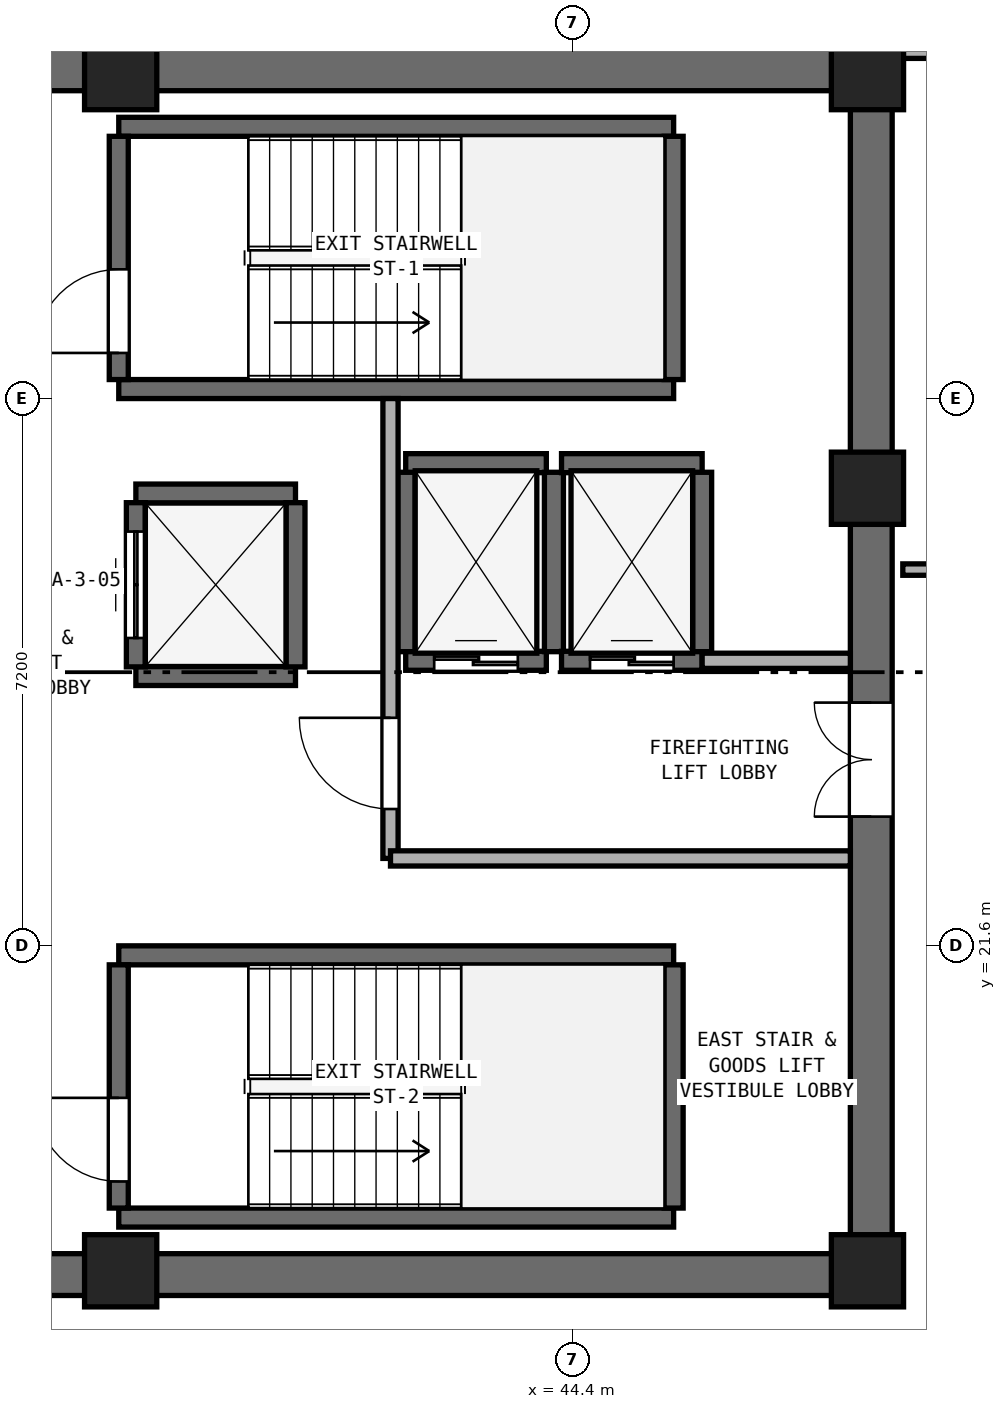
"""IFC4 building model, lengths in metres.
Left out: names, types, materials, properties, quantities, classifications, styles, units other than length and angle.
Written with IfcOpenShell. Run it as: python <this file> out.ifc"""

import sys

from ifc_helpers import new_model, si_unit, direction, frame, frame_2d, origin, origin_2d, place, context, subcontext, project, spatial, rectangle, extrude, element, fill, save


model = new_model("IFC4")
c1 = context("Model", 3, precision=1e-05, world=origin(), true_north=direction((0.0, 1.0)))
c2 = subcontext(c1, "Body", "Model", "MODEL_VIEW")
j1 = project(units=[si_unit("LENGTHUNIT", "METRE"), si_unit("PLANEANGLEUNIT", "RADIAN")], contexts=[c1])
p1 = place(None, origin())
s1 = spatial("IfcSite", under=j1, at=p1, CompositionType="ELEMENT")
p2 = place(p1, origin())
s2 = spatial("IfcBuilding", under=s1, at=p2, CompositionType="ELEMENT")
p3 = place(p2, frame((0.0, 0.0, 189.6)))
s3 = spatial("IfcBuildingStorey", under=s2, at=p3, CompositionType="ELEMENT", Elevation=189.6)
for number, where, z_axis, x_axis in (
    (1, (25.4, 17.275, 0.0), (0.0, 0.0, 1.0), (1.0, 0.0, 0.0)),
    (2, (25.4, 33.125, 0.0), (0.0, 0.0, 1.0), (1.0, 0.0, 0.0)),
):
    element("IfcWall", number, at=place(p3, frame(where, z_axis=z_axis, x_axis=x_axis)), inside=s3, PredefinedType="SHEAR", context=c2, shape_type="SweptSolid", body=[
        extrude(rectangle(XDim=23.2, YDim=0.55, at=frame_2d((11.6, 0.0))), origin(), (0.0, 0.0, 1.0), 3.54),
    ])
p4 = place(p3, frame((48.325, 17.55, 0.0), z_axis=(0.0, 0.0, 1.0), x_axis=(0.0, 1.0, 0.0)))
e3 = element("IfcWall", 3, at=p4, inside=s3, PredefinedType="SHEAR", context=c2, shape_type="SweptSolid", body=[
    extrude(rectangle(XDim=15.3, YDim=0.55, at=frame_2d((7.65, 0.0))), origin(), (0.0, 0.0, 1.0), 3.54),
])
p5 = place(p4, frame((5.75, 0.0, 0.0)))
e4 = element("IfcOpeningElement", 4, at=p5, cuts=e3, PredefinedType="OPENING", context=c2, shape_type="SweptSolid", body=[
    extrude(rectangle(XDim=1.5, YDim=2.15, at=frame_2d((0.75, 1.075))), frame((0.0, 0.285, 0.0), z_axis=(0.0, -1.0, 0.0), x_axis=(1.0, 0.0, 0.0)), (0.0, 0.0, 1.0), 0.57),
])
for number, where, z_axis, x_axis in (
    (5, (38.45, 17.325, 0.0), (0.0, 0.0, 1.0), (1.0, 0.0, 0.0)),
    (6, (48.275, 17.325, 0.0), (0.0, 0.0, 1.0), (1.0, 0.0, 0.0)),
    (7, (48.275, 27.62, 0.0), (0.0, 0.0, 1.0), (1.0, 0.0, 0.0)),
    (8, (48.275, 33.075, 0.0), (0.0, 0.0, 1.0), (1.0, 0.0, 0.0)),
    (9, (38.45, 33.075, 0.0), (0.0, 0.0, 1.0), (1.0, 0.0, 0.0)),
):
    element("IfcColumn", number, at=place(p3, frame(where, z_axis=z_axis, x_axis=x_axis)), inside=s3, PredefinedType="PILASTER", context=c2, shape_type="SweptSolid", body=[
        extrude(rectangle(XDim=0.95, YDim=0.95, at=origin_2d()), origin(), (0.0, 0.0, 1.0), 3.8),
    ])
for number, where, z_axis, x_axis in (
    (10, (38.425, 28.925, 0.0), (0.0, 0.0, 1.0), (1.0, 0.0, 0.0)),
    (11, (38.425, 32.375, 0.0), (0.0, 0.0, 1.0), (1.0, 0.0, 0.0)),
):
    element("IfcWall", number, at=place(p3, frame(where, z_axis=z_axis, x_axis=x_axis)), inside=s3, PredefinedType="SHEAR", context=c2, shape_type="SweptSolid", body=[
        extrude(rectangle(XDim=7.3, YDim=0.25, at=frame_2d((3.65, 0.0))), origin(), (0.0, 0.0, 1.0), 3.54),
    ])
p6 = place(p3, frame((38.425, 29.05, 0.0), z_axis=(0.0, 0.0, 1.0), x_axis=(0.0, 1.0, 0.0)))
e12 = element("IfcWall", 12, at=p6, inside=s3, PredefinedType="SHEAR", context=c2, shape_type="SweptSolid", body=[
    extrude(rectangle(XDim=3.2, YDim=0.25, at=frame_2d((1.6, 0.0))), origin(), (0.0, 0.0, 1.0), 3.54),
])
p7 = place(p6, frame((0.35, 0.0, 0.0)))
e13 = element("IfcOpeningElement", 13, at=p7, cuts=e12, PredefinedType="OPENING", context=c2, shape_type="SweptSolid", body=[
    extrude(rectangle(XDim=1.1, YDim=2.15, at=frame_2d((0.55, 1.075))), frame((0.0, 0.135, 0.0), z_axis=(0.0, -1.0, 0.0), x_axis=(1.0, 0.0, 0.0)), (0.0, 0.0, 1.0), 0.27),
])
p8 = place(p3, frame((45.725, 29.05, 0.0), z_axis=(0.0, 0.0, 1.0), x_axis=(0.0, 1.0, 0.0)))
e14 = element("IfcWall", 14, at=p8, inside=s3, PredefinedType="SHEAR", context=c2, shape_type="SweptSolid", body=[
    extrude(rectangle(XDim=3.2, YDim=0.25, at=frame_2d((1.6, 0.0))), origin(), (0.0, 0.0, 1.0), 3.54),
])
for number, where, z_axis, x_axis in (
    (15, (38.425, 18.025, 0.0), (0.0, 0.0, 1.0), (1.0, 0.0, 0.0)),
    (16, (38.425, 21.475, 0.0), (0.0, 0.0, 1.0), (1.0, 0.0, 0.0)),
):
    element("IfcWall", number, at=place(p3, frame(where, z_axis=z_axis, x_axis=x_axis)), inside=s3, PredefinedType="SHEAR", context=c2, shape_type="SweptSolid", body=[
        extrude(rectangle(XDim=7.3, YDim=0.25, at=frame_2d((3.65, 0.0))), origin(), (0.0, 0.0, 1.0), 3.54),
    ])
p9 = place(p3, frame((38.425, 18.15, 0.0), z_axis=(0.0, 0.0, 1.0), x_axis=(0.0, 1.0, 0.0)))
e17 = element("IfcWall", 17, at=p9, inside=s3, PredefinedType="SHEAR", context=c2, shape_type="SweptSolid", body=[
    extrude(rectangle(XDim=3.2, YDim=0.25, at=frame_2d((1.6, 0.0))), origin(), (0.0, 0.0, 1.0), 3.54),
])
p10 = place(p9, frame((0.35, 0.0, 0.0)))
e18 = element("IfcOpeningElement", 18, at=p10, cuts=e17, PredefinedType="OPENING", context=c2, shape_type="SweptSolid", body=[
    extrude(rectangle(XDim=1.1, YDim=2.15, at=frame_2d((0.55, 1.075))), frame((0.0, 0.135, 0.0), z_axis=(0.0, -1.0, 0.0), x_axis=(1.0, 0.0, 0.0)), (0.0, 0.0, 1.0), 0.27),
])
p11 = place(p3, frame((45.725, 18.15, 0.0), z_axis=(0.0, 0.0, 1.0), x_axis=(0.0, 1.0, 0.0)))
e19 = element("IfcWall", 19, at=p11, inside=s3, PredefinedType="SHEAR", context=c2, shape_type="SweptSolid", body=[
    extrude(rectangle(XDim=3.2, YDim=0.25, at=frame_2d((1.6, 0.0))), origin(), (0.0, 0.0, 1.0), 3.54),
])
p12 = place(p3, frame((42.2, 25.35, 0.0), z_axis=(0.0, 0.0, 1.0), x_axis=(1.0, 0.0, 0.0)))
e20 = element("IfcWall", 20, at=p12, inside=s3, PredefinedType="SHEAR", context=c2, shape_type="SweptSolid", body=[
    extrude(rectangle(XDim=1.85, YDim=0.25, at=frame_2d((0.925, 0.0))), origin(), (0.0, 0.0, 1.0), 3.54),
])
p13 = place(p12, frame((0.375, 0.0, 0.0)))
e21 = element("IfcOpeningElement", 21, at=p13, cuts=e20, PredefinedType="OPENING", context=c2, shape_type="SweptSolid", body=[
    extrude(rectangle(XDim=1.1, YDim=2.15, at=frame_2d((0.55, 1.075))), frame((0.0, 0.135, 0.0), z_axis=(0.0, -1.0, 0.0), x_axis=(1.0, 0.0, 0.0)), (0.0, 0.0, 1.0), 0.27),
])
p14 = place(p3, frame((42.2, 27.95, 0.0), z_axis=(0.0, 0.0, 1.0), x_axis=(1.0, 0.0, 0.0)))
e22 = element("IfcWall", 22, at=p14, inside=s3, PredefinedType="SHEAR", context=c2, shape_type="SweptSolid", body=[
    extrude(rectangle(XDim=1.85, YDim=0.25, at=frame_2d((0.925, 0.0))), origin(), (0.0, 0.0, 1.0), 3.54),
])
for number, where, z_axis, x_axis in (
    (23, (42.2, 25.47, 0.0), (0.0, 0.0, 1.0), (0.0, 1.0, 0.0)),
    (24, (44.15, 25.47, 0.0), (0.0, 0.0, 1.0), (0.0, 1.0, 0.0)),
):
    element("IfcWall", number, at=place(p3, frame(where, z_axis=z_axis, x_axis=x_axis)), inside=s3, PredefinedType="SHEAR", context=c2, shape_type="SweptSolid", body=[
        extrude(rectangle(XDim=2.36, YDim=0.25, at=frame_2d((1.18, 0.0))), origin(), (0.0, 0.0, 1.0), 3.54),
    ])
p15 = place(p3, frame((44.25, 25.35, 0.0), z_axis=(0.0, 0.0, 1.0), x_axis=(1.0, 0.0, 0.0)))
e25 = element("IfcWall", 25, at=p15, inside=s3, PredefinedType="SHEAR", context=c2, shape_type="SweptSolid", body=[
    extrude(rectangle(XDim=1.85, YDim=0.25, at=frame_2d((0.925, 0.0))), origin(), (0.0, 0.0, 1.0), 3.54),
])
p16 = place(p15, frame((0.375, 0.0, 0.0)))
e26 = element("IfcOpeningElement", 26, at=p16, cuts=e25, PredefinedType="OPENING", context=c2, shape_type="SweptSolid", body=[
    extrude(rectangle(XDim=1.1, YDim=2.15, at=frame_2d((0.55, 1.075))), frame((0.0, 0.135, 0.0), z_axis=(0.0, -1.0, 0.0), x_axis=(1.0, 0.0, 0.0)), (0.0, 0.0, 1.0), 0.27),
])
p17 = place(p3, frame((44.25, 27.95, 0.0), z_axis=(0.0, 0.0, 1.0), x_axis=(1.0, 0.0, 0.0)))
e27 = element("IfcWall", 27, at=p17, inside=s3, PredefinedType="SHEAR", context=c2, shape_type="SweptSolid", body=[
    extrude(rectangle(XDim=1.85, YDim=0.25, at=frame_2d((0.925, 0.0))), origin(), (0.0, 0.0, 1.0), 3.54),
])
p18 = place(p3, frame((46.1, 25.47, 0.0), z_axis=(0.0, 0.0, 1.0), x_axis=(0.0, 1.0, 0.0)))
e28 = element("IfcWall", 28, at=p18, inside=s3, PredefinedType="SHEAR", context=c2, shape_type="SweptSolid", body=[
    extrude(rectangle(XDim=2.36, YDim=0.25, at=frame_2d((1.18, 0.0))), origin(), (0.0, 0.0, 1.0), 3.54),
])
for number, where, z_axis, x_axis in (
    (29, (38.65, 25.15, 0.0), (0.0, 0.0, 1.0), (1.0, 0.0, 0.0)),
    (30, (38.65, 27.55, 0.0), (0.0, 0.0, 1.0), (1.0, 0.0, 0.0)),
):
    element("IfcWall", number, at=place(p3, frame(where, z_axis=z_axis, x_axis=x_axis)), inside=s3, PredefinedType="SHEAR", context=c2, shape_type="SweptSolid", body=[
        extrude(rectangle(XDim=2.1, YDim=0.25, at=frame_2d((1.05, 0.0))), origin(), (0.0, 0.0, 1.0), 3.54),
    ])
p19 = place(p3, frame((38.65, 25.27, 0.0), z_axis=(0.0, 0.0, 1.0), x_axis=(0.0, 1.0, 0.0)))
e31 = element("IfcWall", 31, at=p19, inside=s3, PredefinedType="SHEAR", context=c2, shape_type="SweptSolid", body=[
    extrude(rectangle(XDim=2.16, YDim=0.25, at=frame_2d((1.08, 0.0))), origin(), (0.0, 0.0, 1.0), 3.54),
])
p20 = place(p19, frame((0.38, 0.0, 0.0)))
e32 = element("IfcOpeningElement", 32, at=p20, cuts=e31, PredefinedType="OPENING", context=c2, shape_type="SweptSolid", body=[
    extrude(rectangle(XDim=1.4, YDim=2.2, at=frame_2d((0.7, 1.1))), frame((0.0, 0.135, 0.0), z_axis=(0.0, -1.0, 0.0), x_axis=(1.0, 0.0, 0.0)), (0.0, 0.0, 1.0), 0.27),
])
p21 = place(p3, frame((40.75, 25.27, 0.0), z_axis=(0.0, 0.0, 1.0), x_axis=(0.0, 1.0, 0.0)))
e33 = element("IfcWall", 33, at=p21, inside=s3, PredefinedType="SHEAR", context=c2, shape_type="SweptSolid", body=[
    extrude(rectangle(XDim=2.16, YDim=0.25, at=frame_2d((1.08, 0.0))), origin(), (0.0, 0.0, 1.0), 3.54),
])
p22 = place(p3, frame((42.0, 22.75, 0.0), z_axis=(0.0, 0.0, 1.0), x_axis=(0.0, 1.0, 0.0)))
e34 = element("IfcWall", 34, at=p22, inside=s3, PredefinedType="SOLIDWALL", context=c2, shape_type="SweptSolid", body=[
    extrude(rectangle(XDim=6.05, YDim=0.2, at=frame_2d((3.025, 0.0))), origin(), (0.0, 0.0, 1.0), 3.54),
])
p23 = place(p22, frame((0.65, 0.0, 0.0)))
e35 = element("IfcOpeningElement", 35, at=p23, cuts=e34, PredefinedType="OPENING", context=c2, shape_type="SweptSolid", body=[
    extrude(rectangle(XDim=1.2, YDim=2.15, at=frame_2d((0.6, 1.075))), frame((0.0, 0.11, 0.0), z_axis=(0.0, -1.0, 0.0), x_axis=(1.0, 0.0, 0.0)), (0.0, 0.0, 1.0), 0.22),
])
p24 = place(p3, frame((42.0, 22.75, 0.0), z_axis=(0.0, 0.0, 1.0), x_axis=(1.0, 0.0, 0.0)))
e36 = element("IfcWall", 36, at=p24, inside=s3, PredefinedType="SOLIDWALL", context=c2, shape_type="SweptSolid", body=[
    extrude(rectangle(XDim=6.05, YDim=0.2, at=frame_2d((3.025, 0.0))), origin(), (0.0, 0.0, 1.0), 3.54),
])
p25 = place(p3, frame((46.1, 25.35, 0.0), z_axis=(0.0, 0.0, 1.0), x_axis=(1.0, 0.0, 0.0)))
e37 = element("IfcWall", 37, at=p25, inside=s3, PredefinedType="SOLIDWALL", context=c2, shape_type="SweptSolid", body=[
    extrude(rectangle(XDim=1.95, YDim=0.2, at=frame_2d((0.975, 0.0))), origin(), (0.0, 0.0, 1.0), 3.54),
])
p26 = place(p3, frame((48.74, 26.55, 0.0), z_axis=(0.0, 0.0, 1.0), x_axis=(1.0, 0.0, 0.0)))
e38 = element("IfcWall", 38, at=p26, inside=s3, PredefinedType="PARTITIONING", context=c2, shape_type="SweptSolid", body=[
    extrude(rectangle(XDim=12.855, YDim=0.15, at=frame_2d((6.427, 0.0))), origin(), (0.0, 0.0, 1.0), 3.54),
])
p27 = place(p26, frame((5.927, 0.0, 0.0)))
e39 = element("IfcOpeningElement", 39, at=p27, cuts=e38, PredefinedType="OPENING", context=c2, shape_type="SweptSolid", body=[
    extrude(rectangle(XDim=1.0, YDim=2.12, at=frame_2d((0.5, 1.06))), frame((0.0, 0.085, 0.0), z_axis=(0.0, -1.0, 0.0), x_axis=(1.0, 0.0, 0.0)), (0.0, 0.0, 1.0), 0.17),
])
p28 = place(p3, frame((48.74, 33.35, 0.0), z_axis=(0.0, 0.0, 1.0), x_axis=(1.0, 0.0, 0.0)))
e40 = element("IfcWall", 40, at=p28, inside=s3, PredefinedType="PARTITIONING", context=c2, shape_type="SweptSolid", body=[
    extrude(rectangle(XDim=2.759, YDim=0.15, at=frame_2d((1.379, 0.0))), origin(), (0.0, 0.0, 1.0), 2.923),
])
p29 = place(p7, origin())
e41 = element("IfcDoor", 41, at=p29, inside=s3, OperationType="SINGLE_SWING_LEFT", PredefinedType="DOOR", context=c2, shape_type="SweptSolid", body=[
    extrude(rectangle(XDim=1.1, YDim=2.15, at=frame_2d((0.55, 1.075))), frame((0.0, 0.025, 0.0), z_axis=(0.0, -1.0, 0.0), x_axis=(1.0, 0.0, 0.0)), (0.0, 0.0, 1.0), 0.05),
])
fill(e13, e41)
p30 = place(p10, origin())
e42 = element("IfcDoor", 42, at=p30, inside=s3, OperationType="SINGLE_SWING_RIGHT", PredefinedType="DOOR", context=c2, shape_type="SweptSolid", body=[
    extrude(rectangle(XDim=1.1, YDim=2.15, at=frame_2d((0.55, 1.075))), frame((0.0, 0.025, 0.0), z_axis=(0.0, -1.0, 0.0), x_axis=(1.0, 0.0, 0.0)), (0.0, 0.0, 1.0), 0.05),
])
fill(e18, e42)
p31 = place(p13, origin())
e43 = element("IfcDoor", 43, at=p31, inside=s3, OperationType="DOUBLE_DOOR_SLIDING", PredefinedType="DOOR", context=c2, shape_type="SweptSolid", body=[
    extrude(rectangle(XDim=1.1, YDim=2.15, at=frame_2d((0.55, 1.075))), frame((0.0, 0.025, 0.0), z_axis=(0.0, -1.0, 0.0), x_axis=(1.0, 0.0, 0.0)), (0.0, 0.0, 1.0), 0.05),
])
fill(e21, e43)
p32 = place(p16, origin())
e44 = element("IfcDoor", 44, at=p32, inside=s3, OperationType="DOUBLE_DOOR_SLIDING", PredefinedType="DOOR", context=c2, shape_type="SweptSolid", body=[
    extrude(rectangle(XDim=1.1, YDim=2.15, at=frame_2d((0.55, 1.075))), frame((0.0, 0.025, 0.0), z_axis=(0.0, -1.0, 0.0), x_axis=(1.0, 0.0, 0.0)), (0.0, 0.0, 1.0), 0.05),
])
fill(e26, e44)
p33 = place(p20, origin())
e45 = element("IfcDoor", 45, at=p33, inside=s3, OperationType="DOUBLE_DOOR_SLIDING", PredefinedType="DOOR", context=c2, shape_type="SweptSolid", body=[
    extrude(rectangle(XDim=1.4, YDim=2.2, at=frame_2d((0.7, 1.1))), frame((0.0, 0.025, 0.0), z_axis=(0.0, -1.0, 0.0), x_axis=(1.0, 0.0, 0.0)), (0.0, 0.0, 1.0), 0.05),
])
fill(e32, e45)
p34 = place(p23, origin())
e46 = element("IfcDoor", 46, at=p34, inside=s3, OperationType="SINGLE_SWING_RIGHT", PredefinedType="DOOR", context=c2, shape_type="SweptSolid", body=[
    extrude(rectangle(XDim=1.2, YDim=2.15, at=frame_2d((0.6, 1.075))), frame((0.0, 0.025, 0.0), z_axis=(0.0, -1.0, 0.0), x_axis=(1.0, 0.0, 0.0)), (0.0, 0.0, 1.0), 0.05),
])
fill(e35, e46)
p35 = place(p5, origin())
e47 = element("IfcDoor", 47, at=p35, inside=s3, OperationType="DOUBLE_DOOR_SINGLE_SWING", PredefinedType="DOOR", context=c2, shape_type="SweptSolid", body=[
    extrude(rectangle(XDim=1.5, YDim=2.15, at=frame_2d((0.75, 1.075))), frame((0.0, 0.025, 0.0), z_axis=(0.0, -1.0, 0.0), x_axis=(1.0, 0.0, 0.0)), (0.0, 0.0, 1.0), 0.05),
])
fill(e4, e47)
save(model, sys.argv[1])
